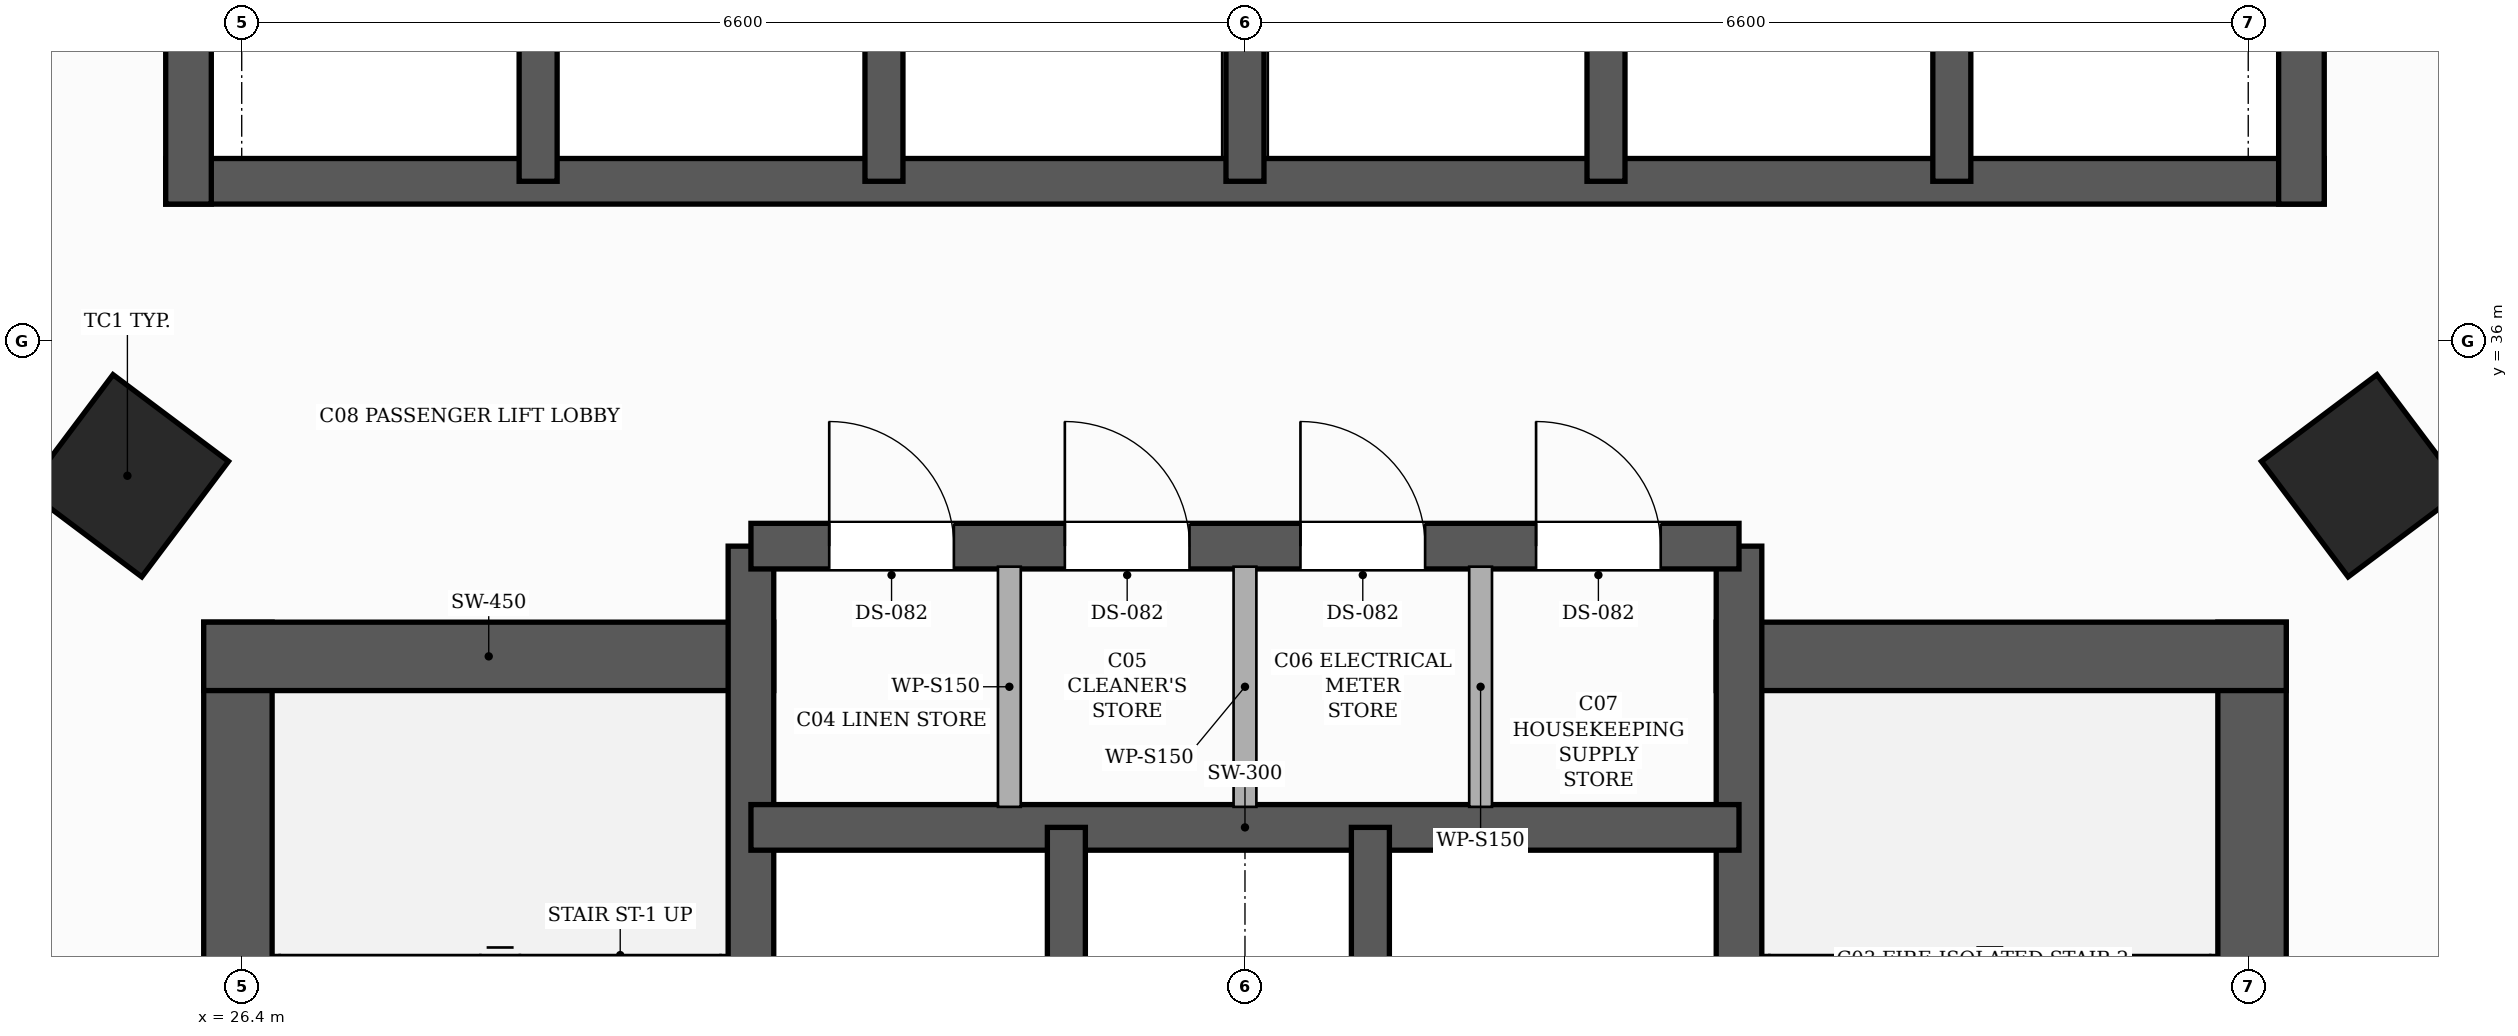
"""IFC4 building model, lengths in metres.
Left out: names, types, materials, properties, quantities, classifications, styles, units other than length and angle.
Written with IfcOpenShell. Run it as: python <this file> out.ifc"""

import sys

from ifc_helpers import new_model, si_unit, direction, frame, frame_2d, origin, origin_2d, place, context, subcontext, project, spatial, rectangle, hollow_rectangle, extrude, element, fill, save


model = new_model("IFC4")
c1 = context("Model", 3, precision=1e-05, world=origin(), true_north=direction((0.0, 1.0)))
c2 = subcontext(c1, "Body", "Model", "MODEL_VIEW")
j1 = project(units=[si_unit("LENGTHUNIT", "METRE"), si_unit("PLANEANGLEUNIT", "RADIAN")], contexts=[c1])
p1 = place(None, origin())
s1 = spatial("IfcSite", under=j1, at=p1, CompositionType="ELEMENT")
p2 = place(p1, origin())
s2 = spatial("IfcBuilding", under=s1, at=p2, CompositionType="ELEMENT")
p3 = place(p2, frame((0.0, 0.0, 18.4)))
s3 = spatial("IfcBuildingStorey", under=s2, at=p3, CompositionType="ELEMENT", Elevation=18.4)
p4 = place(p3, frame((26.375, 26.45, 0.0), z_axis=(0.0, 0.0, 1.0), x_axis=(0.0, 1.0, 0.0)))
e1 = element("IfcWall", 1, at=p4, inside=s3, PredefinedType="SHEAR", context=c2, shape_type="SweptSolid", body=[
    extrude(rectangle(XDim=7.7, YDim=0.45, at=frame_2d((3.85, 0.0))), origin(), (0.0, 0.0, 1.0), 5.2),
])
p5 = place(p3, frame((26.15, 33.925, 0.0), z_axis=(0.0, 0.0, 1.0), x_axis=(1.0, 0.0, 0.0)))
e2 = element("IfcWall", 2, at=p5, inside=s3, PredefinedType="SHEAR", context=c2, shape_type="SweptSolid", body=[
    extrude(rectangle(XDim=3.75, YDim=0.45, at=frame_2d((1.875, 0.0))), origin(), (0.0, 0.0, 1.0), 5.2),
])
p6 = place(p3, frame((39.625, 26.45, 0.0), z_axis=(0.0, 0.0, 1.0), x_axis=(0.0, 1.0, 0.0)))
e3 = element("IfcWall", 3, at=p6, inside=s3, PredefinedType="SHEAR", context=c2, shape_type="SweptSolid", body=[
    extrude(rectangle(XDim=7.7, YDim=0.45, at=frame_2d((3.85, 0.0))), origin(), (0.0, 0.0, 1.0), 5.2),
])
p7 = place(p3, frame((36.1, 33.925, 0.0), z_axis=(0.0, 0.0, 1.0), x_axis=(1.0, 0.0, 0.0)))
e4 = element("IfcWall", 4, at=p7, inside=s3, PredefinedType="SHEAR", context=c2, shape_type="SweptSolid", body=[
    extrude(rectangle(XDim=3.75, YDim=0.45, at=frame_2d((1.875, 0.0))), origin(), (0.0, 0.0, 1.0), 5.2),
])
p8 = place(p3, frame((29.75, 26.45, 0.0), z_axis=(0.0, 0.0, 1.0), x_axis=(0.0, 1.0, 0.0)))
e5 = element("IfcWall", 5, at=p8, inside=s3, PredefinedType="SHEAR", context=c2, shape_type="SweptSolid", body=[
    extrude(rectangle(XDim=8.2, YDim=0.3, at=frame_2d((4.1, 0.0))), origin(), (0.0, 0.0, 1.0), 5.2),
])
p9 = place(p8, frame((0.6, 0.0, 0.0)))
e6 = element("IfcOpeningElement", 6, at=p9, cuts=e5, PredefinedType="OPENING", context=c2, shape_type="SweptSolid", body=[
    extrude(rectangle(XDim=1.05, YDim=2.15, at=frame_2d((0.525, 1.075))), frame((0.0, 0.16, 0.0), z_axis=(0.0, -1.0, 0.0), x_axis=(1.0, 0.0, 0.0)), (0.0, 0.0, 1.0), 0.32),
])
p10 = place(p3, frame((36.25, 26.45, 0.0), z_axis=(0.0, 0.0, 1.0), x_axis=(0.0, 1.0, 0.0)))
e7 = element("IfcWall", 7, at=p10, inside=s3, PredefinedType="SHEAR", context=c2, shape_type="SweptSolid", body=[
    extrude(rectangle(XDim=8.2, YDim=0.3, at=frame_2d((4.1, 0.0))), origin(), (0.0, 0.0, 1.0), 5.2),
])
p11 = place(p10, frame((0.6, 0.0, 0.0)))
e8 = element("IfcOpeningElement", 8, at=p11, cuts=e7, PredefinedType="OPENING", context=c2, shape_type="SweptSolid", body=[
    extrude(rectangle(XDim=1.05, YDim=2.15, at=frame_2d((0.525, 1.075))), frame((0.0, 0.16, 0.0), z_axis=(0.0, -1.0, 0.0), x_axis=(1.0, 0.0, 0.0)), (0.0, 0.0, 1.0), 0.32),
])
p12 = place(p3, frame((29.75, 32.8, 0.0), z_axis=(0.0, 0.0, 1.0), x_axis=(1.0, 0.0, 0.0)))
e9 = element("IfcWall", 9, at=p12, inside=s3, PredefinedType="SHEAR", context=c2, shape_type="SweptSolid", body=[
    extrude(rectangle(XDim=6.5, YDim=0.3, at=frame_2d((3.25, 0.0))), origin(), (0.0, 0.0, 1.0), 5.2),
])
for number, where, z_axis, x_axis in (
    (10, (31.825, 29.9, 0.0), (0.0, 0.0, 1.0), (0.0, 1.0, 0.0)),
    (11, (33.825, 29.9, 0.0), (0.0, 0.0, 1.0), (0.0, 1.0, 0.0)),
):
    element("IfcWall", number, at=place(p3, frame(where, z_axis=z_axis, x_axis=x_axis)), inside=s3, PredefinedType="SHEAR", context=c2, shape_type="SweptSolid", body=[
        extrude(rectangle(XDim=2.9, YDim=0.25, at=frame_2d((1.45, 0.0))), origin(), (0.0, 0.0, 1.0), 5.2),
    ])
p13 = place(p3, frame((29.75, 34.65, 0.0), z_axis=(0.0, 0.0, 1.0), x_axis=(1.0, 0.0, 0.0)))
e12 = element("IfcWall", 12, at=p13, inside=s3, PredefinedType="SHEAR", context=c2, shape_type="SweptSolid", body=[
    extrude(rectangle(XDim=6.5, YDim=0.3, at=frame_2d((3.25, 0.0))), origin(), (0.0, 0.0, 1.0), 5.2),
])
p14 = place(p13, frame((0.515, 0.0, 0.0)))
e13 = element("IfcOpeningElement", 13, at=p14, cuts=e12, PredefinedType="OPENING", context=c2, shape_type="SweptSolid", body=[
    extrude(rectangle(XDim=0.82, YDim=2.1, at=frame_2d((0.41, 1.05))), frame((0.0, 0.16, 0.0), z_axis=(0.0, -1.0, 0.0), x_axis=(1.0, 0.0, 0.0)), (0.0, 0.0, 1.0), 0.32),
])
p15 = place(p13, frame((2.065, 0.0, 0.0)))
e14 = element("IfcOpeningElement", 14, at=p15, cuts=e12, PredefinedType="OPENING", context=c2, shape_type="SweptSolid", body=[
    extrude(rectangle(XDim=0.82, YDim=2.1, at=frame_2d((0.41, 1.05))), frame((0.0, 0.16, 0.0), z_axis=(0.0, -1.0, 0.0), x_axis=(1.0, 0.0, 0.0)), (0.0, 0.0, 1.0), 0.32),
])
p16 = place(p13, frame((3.615, 0.0, 0.0)))
e15 = element("IfcOpeningElement", 15, at=p16, cuts=e12, PredefinedType="OPENING", context=c2, shape_type="SweptSolid", body=[
    extrude(rectangle(XDim=0.82, YDim=2.1, at=frame_2d((0.41, 1.05))), frame((0.0, 0.16, 0.0), z_axis=(0.0, -1.0, 0.0), x_axis=(1.0, 0.0, 0.0)), (0.0, 0.0, 1.0), 0.32),
])
p17 = place(p13, frame((5.165, 0.0, 0.0)))
e16 = element("IfcOpeningElement", 16, at=p17, cuts=e12, PredefinedType="OPENING", context=c2, shape_type="SweptSolid", body=[
    extrude(rectangle(XDim=0.82, YDim=2.1, at=frame_2d((0.41, 1.05))), frame((0.0, 0.16, 0.0), z_axis=(0.0, -1.0, 0.0), x_axis=(1.0, 0.0, 0.0)), (0.0, 0.0, 1.0), 0.32),
])
p18 = place(p3, frame((40.1, 37.05, 0.0), z_axis=(0.0, 0.0, 1.0), x_axis=(-1.0, 0.0, 0.0)))
e17 = element("IfcWall", 17, at=p18, inside=s3, PredefinedType="SHEAR", context=c2, shape_type="SweptSolid", body=[
    extrude(rectangle(XDim=14.2, YDim=0.3, at=frame_2d((7.1, 0.0))), origin(), (0.0, 0.0, 1.0), 5.2),
])
for number, where, z_axis, x_axis in (
    (18, (26.05, 36.9, 0.0), (0.0, 0.0, 1.0), (0.0, 1.0, 0.0)),
    (19, (39.95, 36.9, 0.0), (0.0, 0.0, 1.0), (0.0, 1.0, 0.0)),
):
    element("IfcWall", number, at=place(p3, frame(where, z_axis=z_axis, x_axis=x_axis)), inside=s3, PredefinedType="SHEAR", context=c2, shape_type="SweptSolid", body=[
        extrude(rectangle(XDim=2.85, YDim=0.3, at=frame_2d((1.425, 0.0))), origin(), (0.0, 0.0, 1.0), 5.2),
    ])
for number, where, z_axis, x_axis in (
    (20, (28.35, 37.05, 0.0), (0.0, 0.0, 1.0), (0.0, 1.0, 0.0)),
    (21, (30.625, 37.05, 0.0), (0.0, 0.0, 1.0), (0.0, 1.0, 0.0)),
    (22, (33.0, 37.05, 0.0), (0.0, 0.0, 1.0), (0.0, 1.0, 0.0)),
    (23, (35.375, 37.05, 0.0), (0.0, 0.0, 1.0), (0.0, 1.0, 0.0)),
    (24, (37.65, 37.05, 0.0), (0.0, 0.0, 1.0), (0.0, 1.0, 0.0)),
):
    element("IfcWall", number, at=place(p3, frame(where, z_axis=z_axis, x_axis=x_axis)), inside=s3, PredefinedType="SHEAR", context=c2, shape_type="SweptSolid", body=[
        extrude(rectangle(XDim=2.55, YDim=0.25, at=frame_2d((1.275, 0.0))), origin(), (0.0, 0.0, 1.0), 5.2),
    ])
for number, where, z_axis, x_axis in (
    (25, (25.648, 35.113, 0.0), (0.0, 0.0, 1.0), (0.6, 0.8, 0.0)),
    (26, (40.352, 35.113, 0.0), (0.0, 0.0, 1.0), (-0.6, 0.8, 0.0)),
):
    element("IfcColumn", number, at=place(p3, frame(where, z_axis=z_axis, x_axis=x_axis)), inside=s3, PredefinedType="COLUMN", context=c2, shape_type="SweptSolid", body=[
        extrude(hollow_rectangle(XDim=0.95, YDim=0.95, WallThickness=0.032, at=origin_2d()), origin(), (0.0, 0.0, 1.0), 5.2),
    ])
for number, where, z_axis, x_axis in (
    (27, (31.45, 32.935, 0.0), (0.0, 0.0, 1.0), (0.0, 1.0, 0.0)),
    (28, (33.0, 32.935, 0.0), (0.0, 0.0, 1.0), (0.0, 1.0, 0.0)),
    (29, (34.55, 32.935, 0.0), (0.0, 0.0, 1.0), (0.0, 1.0, 0.0)),
):
    element("IfcWall", number, at=place(p3, frame(where, z_axis=z_axis, x_axis=x_axis)), inside=s3, PredefinedType="PARTITIONING", context=c2, shape_type="SweptSolid", body=[
        extrude(rectangle(XDim=1.58, YDim=0.15, at=frame_2d((0.79, 0.0))), origin(), (0.0, 0.0, 1.0), 4.96),
    ])
p19 = place(p14, origin())
e30 = element("IfcDoor", 30, at=p19, inside=s3, OperationType="SINGLE_SWING_LEFT", PredefinedType="DOOR", context=c2, shape_type="SweptSolid", body=[
    extrude(rectangle(XDim=0.82, YDim=2.1, at=frame_2d((0.41, 1.05))), frame((0.0, 0.025, 0.0), z_axis=(0.0, -1.0, 0.0), x_axis=(1.0, 0.0, 0.0)), (0.0, 0.0, 1.0), 0.05),
])
fill(e13, e30)
p20 = place(p15, origin())
e31 = element("IfcDoor", 31, at=p20, inside=s3, OperationType="SINGLE_SWING_LEFT", PredefinedType="DOOR", context=c2, shape_type="SweptSolid", body=[
    extrude(rectangle(XDim=0.82, YDim=2.1, at=frame_2d((0.41, 1.05))), frame((0.0, 0.025, 0.0), z_axis=(0.0, -1.0, 0.0), x_axis=(1.0, 0.0, 0.0)), (0.0, 0.0, 1.0), 0.05),
])
fill(e14, e31)
p21 = place(p16, origin())
e32 = element("IfcDoor", 32, at=p21, inside=s3, OperationType="SINGLE_SWING_LEFT", PredefinedType="DOOR", context=c2, shape_type="SweptSolid", body=[
    extrude(rectangle(XDim=0.82, YDim=2.1, at=frame_2d((0.41, 1.05))), frame((0.0, 0.025, 0.0), z_axis=(0.0, -1.0, 0.0), x_axis=(1.0, 0.0, 0.0)), (0.0, 0.0, 1.0), 0.05),
])
fill(e15, e32)
p22 = place(p17, origin())
e33 = element("IfcDoor", 33, at=p22, inside=s3, OperationType="SINGLE_SWING_LEFT", PredefinedType="DOOR", context=c2, shape_type="SweptSolid", body=[
    extrude(rectangle(XDim=0.82, YDim=2.1, at=frame_2d((0.41, 1.05))), frame((0.0, 0.025, 0.0), z_axis=(0.0, -1.0, 0.0), x_axis=(1.0, 0.0, 0.0)), (0.0, 0.0, 1.0), 0.05),
])
fill(e16, e33)
save(model, sys.argv[1])
